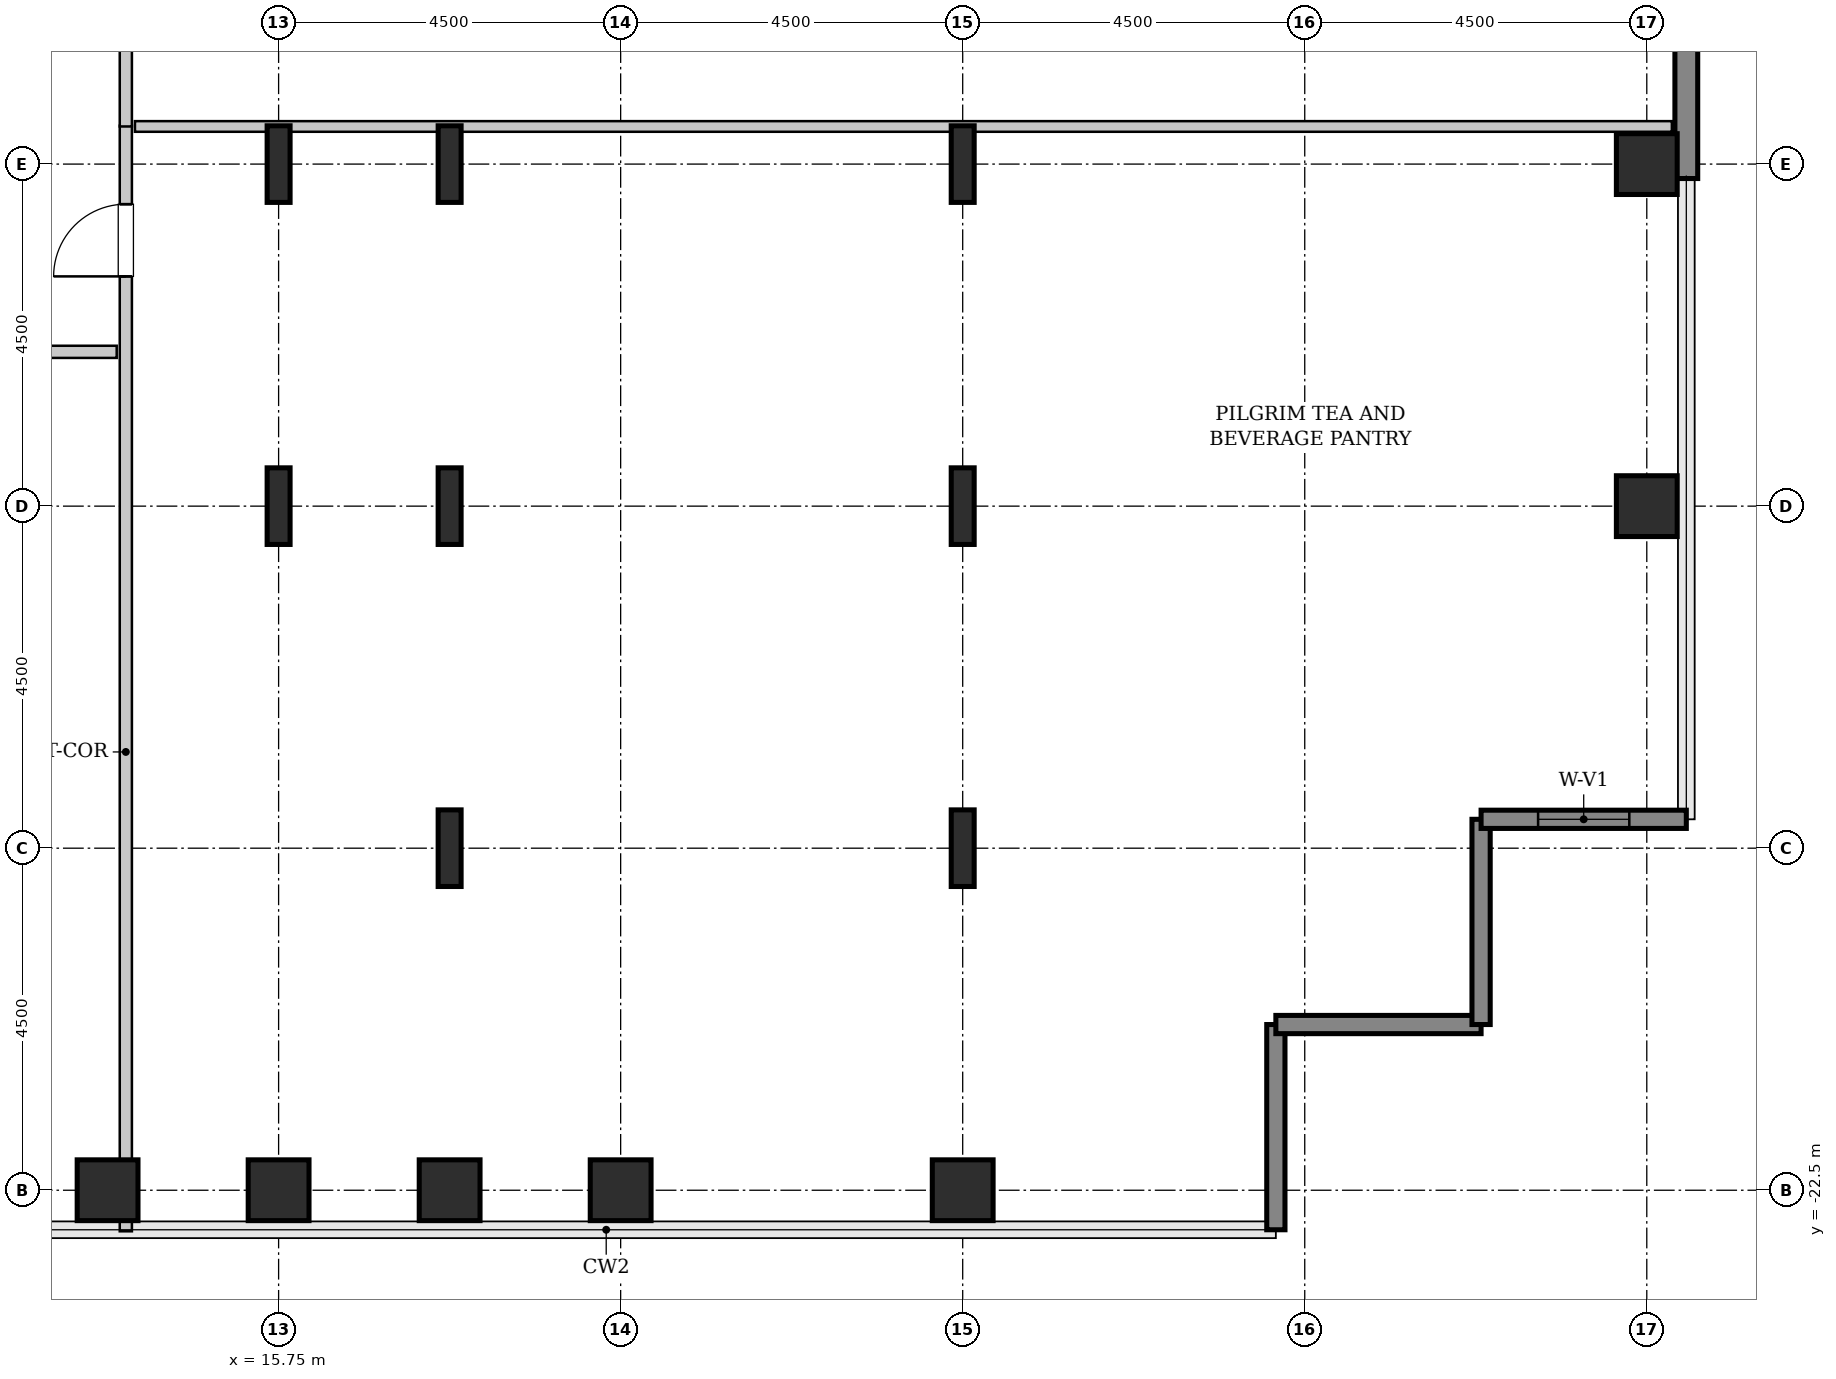
"""IFC4 building model, lengths in metres.
Left out: names, types, materials, properties, quantities, classifications, styles, units other than length and angle.
Written with IfcOpenShell. Run it as: python <this file> out.ifc"""

import sys

from ifc_helpers import new_model, si_unit, direction, frame, frame_2d, origin, origin_2d, place, context, subcontext, project, spatial, rectangle, hollow_rectangle, i_section, extrude, source, transform, mapped, element, fill, save


model = new_model("IFC4")
c1 = context("Model", 3, precision=1e-05, world=origin(), true_north=direction((0.0, 1.0)))
c2 = subcontext(c1, "Body", "Model", "MODEL_VIEW")
j1 = project(units=[si_unit("LENGTHUNIT", "METRE"), si_unit("PLANEANGLEUNIT", "RADIAN")], contexts=[c1])
p1 = place(None, origin())
s1 = spatial("IfcSite", under=j1, at=p1, CompositionType="ELEMENT")
p2 = place(p1, origin())
s2 = spatial("IfcBuilding", under=s1, at=p2, CompositionType="ELEMENT")
p3 = place(p2, frame((0.0, 0.0, 136.4)))
s3 = spatial("IfcBuildingStorey", under=s2, at=p3, CompositionType="ELEMENT", Elevation=136.4)
m1 = source(origin(), c2, "Body", "SweptSolid", [
    extrude(hollow_rectangle(XDim=0.8, YDim=0.8, WallThickness=0.04, InnerFilletRadius=0.04, OuterFilletRadius=0.08, at=origin_2d()), origin(), (0.0, 0.0, 1.0), 3.8),
])
for number, where, z_axis, x_axis in (
    (1, (13.5, -22.5, 0.0), (0.0, 0.0, 1.0), (1.0, 0.0, 0.0)),
    (2, (15.75, -22.5, 0.0), (0.0, 0.0, 1.0), (1.0, 0.0, 0.0)),
):
    element("IfcColumn", number, at=place(p3, frame(where, z_axis=z_axis, x_axis=x_axis)), inside=s3, PredefinedType="COLUMN", context=c2, shape_type="MappedRepresentation", body=[
        mapped(m1, transform((0.0, 0.0, 0.0), x_axis=(1.0, 0.0, 0.0), y_axis=(0.0, 1.0, 0.0), z_axis=(0.0, 0.0, 1.0), scale=1.0)),
    ])
m2 = source(origin(), c2, "Body", "SweptSolid", [
    extrude(i_section(OverallWidth=0.302, OverallDepth=1.008, WebThickness=0.021, FlangeThickness=0.04, FilletRadius=0.03, at=origin_2d()), origin(), (0.0, 0.0, 1.0), 3.8),
])
for number, where, z_axis, x_axis in (
    (3, (15.75, -13.5, 0.0), (0.0, 0.0, 1.0), (1.0, 0.0, 0.0)),
    (4, (15.75, -9.0, 0.0), (0.0, 0.0, 1.0), (1.0, 0.0, 0.0)),
):
    element("IfcColumn", number, at=place(p3, frame(where, z_axis=z_axis, x_axis=x_axis)), inside=s3, PredefinedType="COLUMN", context=c2, shape_type="MappedRepresentation", body=[
        mapped(m2, transform((0.0, 0.0, 0.0), x_axis=(1.0, 0.0, 0.0), y_axis=(0.0, 1.0, 0.0), z_axis=(0.0, 0.0, 1.0), scale=1.0)),
    ])
p4 = place(p3, frame((18.0, -22.5, 0.0), z_axis=(0.0, 0.0, 1.0), x_axis=(1.0, 0.0, 0.0)))
e5 = element("IfcColumn", 5, at=p4, inside=s3, PredefinedType="COLUMN", context=c2, shape_type="MappedRepresentation", body=[
    mapped(m1, transform((0.0, 0.0, 0.0), x_axis=(1.0, 0.0, 0.0), y_axis=(0.0, 1.0, 0.0), z_axis=(0.0, 0.0, 1.0), scale=1.0)),
])
for number, where, z_axis, x_axis in (
    (6, (18.0, -18.0, 0.0), (0.0, 0.0, 1.0), (1.0, 0.0, 0.0)),
    (7, (18.0, -13.5, 0.0), (0.0, 0.0, 1.0), (1.0, 0.0, 0.0)),
    (8, (18.0, -9.0, 0.0), (0.0, 0.0, 1.0), (1.0, 0.0, 0.0)),
):
    element("IfcColumn", number, at=place(p3, frame(where, z_axis=z_axis, x_axis=x_axis)), inside=s3, PredefinedType="COLUMN", context=c2, shape_type="MappedRepresentation", body=[
        mapped(m2, transform((0.0, 0.0, 0.0), x_axis=(1.0, 0.0, 0.0), y_axis=(0.0, 1.0, 0.0), z_axis=(0.0, 0.0, 1.0), scale=1.0)),
    ])
for number, where, z_axis, x_axis in (
    (9, (20.25, -22.5, 0.0), (0.0, 0.0, 1.0), (1.0, 0.0, 0.0)),
    (10, (24.75, -22.5, 0.0), (0.0, 0.0, 1.0), (1.0, 0.0, 0.0)),
):
    element("IfcColumn", number, at=place(p3, frame(where, z_axis=z_axis, x_axis=x_axis)), inside=s3, PredefinedType="COLUMN", context=c2, shape_type="MappedRepresentation", body=[
        mapped(m1, transform((0.0, 0.0, 0.0), x_axis=(1.0, 0.0, 0.0), y_axis=(0.0, 1.0, 0.0), z_axis=(0.0, 0.0, 1.0), scale=1.0)),
    ])
for number, where, z_axis, x_axis in (
    (11, (24.75, -18.0, 0.0), (0.0, 0.0, 1.0), (1.0, 0.0, 0.0)),
    (12, (24.75, -13.5, 0.0), (0.0, 0.0, 1.0), (1.0, 0.0, 0.0)),
    (13, (24.75, -9.0, 0.0), (0.0, 0.0, 1.0), (1.0, 0.0, 0.0)),
):
    element("IfcColumn", number, at=place(p3, frame(where, z_axis=z_axis, x_axis=x_axis)), inside=s3, PredefinedType="COLUMN", context=c2, shape_type="MappedRepresentation", body=[
        mapped(m2, transform((0.0, 0.0, 0.0), x_axis=(1.0, 0.0, 0.0), y_axis=(0.0, 1.0, 0.0), z_axis=(0.0, 0.0, 1.0), scale=1.0)),
    ])
for number, where, z_axis, x_axis in (
    (14, (33.75, -13.5, 0.0), (0.0, 0.0, 1.0), (1.0, 0.0, 0.0)),
    (15, (33.75, -9.0, 0.0), (0.0, 0.0, 1.0), (1.0, 0.0, 0.0)),
):
    element("IfcColumn", number, at=place(p3, frame(where, z_axis=z_axis, x_axis=x_axis)), inside=s3, PredefinedType="COLUMN", context=c2, shape_type="MappedRepresentation", body=[
        mapped(m1, transform((0.0, 0.0, 0.0), x_axis=(1.0, 0.0, 0.0), y_axis=(0.0, 1.0, 0.0), z_axis=(0.0, 0.0, 1.0), scale=1.0)),
    ])
m3 = source(origin(), c2, "Body", "SweptSolid", [
    extrude(rectangle(XDim=4.88, YDim=0.3, at=frame_2d((2.44, 0.0))), origin(), (0.0, 0.0, 1.0), 3.55),
])
p5 = place(p3, frame((34.27, -9.19, 0.0), z_axis=(0.0, 0.0, 1.0), x_axis=(0.0, 1.0, 0.0)))
e16 = element("IfcWall", 16, at=p5, inside=s3, PredefinedType="SHEAR", context=c2, shape_type="MappedRepresentation", body=[
    mapped(m3, transform((0.0, 0.0, 0.0), x_axis=(1.0, 0.0, 0.0), y_axis=(0.0, 1.0, 0.0), z_axis=(0.0, 0.0, 1.0), scale=1.0)),
])
m4 = source(origin(), c2, "Body", "SweptSolid", [
    extrude(rectangle(XDim=2.7, YDim=0.24, at=frame_2d((1.35, 0.0))), origin(), (0.0, 0.0, 1.0), 3.55),
])
for number, where, z_axis, x_axis in (
    (17, (28.87, -23.02, 0.0), (0.0, 0.0, 1.0), (0.0, 1.0, 0.0)),
    (18, (28.87, -20.32, 0.0), (0.0, 0.0, 1.0), (1.0, 0.0, 0.0)),
    (19, (31.57, -20.32, 0.0), (0.0, 0.0, 1.0), (0.0, 1.0, 0.0)),
):
    element("IfcWall", number, at=place(p3, frame(where, z_axis=z_axis, x_axis=x_axis)), inside=s3, PredefinedType="SHEAR", context=c2, shape_type="MappedRepresentation", body=[
        mapped(m4, transform((0.0, 0.0, 0.0), x_axis=(1.0, 0.0, 0.0), y_axis=(0.0, 1.0, 0.0), z_axis=(0.0, 0.0, 1.0), scale=1.0)),
    ])
p6 = place(p3, frame((31.57, -17.62, 0.0), z_axis=(0.0, 0.0, 1.0), x_axis=(1.0, 0.0, 0.0)))
e20 = element("IfcWall", 20, at=p6, inside=s3, PredefinedType="SHEAR", context=c2, shape_type="MappedRepresentation", body=[
    mapped(m4, transform((0.0, 0.0, 0.0), x_axis=(1.0, 0.0, 0.0), y_axis=(0.0, 1.0, 0.0), z_axis=(0.0, 0.0, 1.0), scale=1.0)),
])
p7 = place(p6, frame((0.75, 0.0, 0.85)))
e21 = element("IfcOpeningElement", 21, at=p7, cuts=e20, PredefinedType="OPENING", context=c2, shape_type="SweptSolid", body=[
    extrude(rectangle(XDim=1.2, YDim=1.8, at=frame_2d((0.6, 0.9))), frame((0.0, 0.13, 0.0), z_axis=(0.0, -1.0, 0.0), x_axis=(1.0, 0.0, 0.0)), (0.0, 0.0, 1.0), 0.26),
])
m5 = source(origin(), c2, "Body", "SweptSolid", [
    extrude(rectangle(XDim=14.545, YDim=0.16, at=frame_2d((7.272, 0.0))), origin(), (0.0, 0.0, 1.0), 3.535),
])
p8 = place(p3, frame((13.74, -23.04, 0.0), z_axis=(0.0, 0.0, 1.0), x_axis=(0.0, 1.0, 0.0)))
e22 = element("IfcWall", 22, at=p8, inside=s3, PredefinedType="PARTITIONING", context=c2, shape_type="MappedRepresentation", body=[
    mapped(m5, transform((0.0, 0.0, 0.0), x_axis=(1.0, 0.0, 0.0), y_axis=(0.0, 1.0, 0.0), z_axis=(0.0, 0.0, 1.0), scale=1.0)),
])
p9 = place(p8, frame((12.562, 0.0, 0.0)))
e23 = element("IfcOpeningElement", 23, at=p9, cuts=e22, PredefinedType="OPENING", context=c2, shape_type="SweptSolid", body=[
    extrude(rectangle(XDim=0.95, YDim=2.1, at=frame_2d((0.475, 1.05))), frame((0.0, 0.09, 0.0), z_axis=(0.0, -1.0, 0.0), x_axis=(1.0, 0.0, 0.0)), (0.0, 0.0, 1.0), 0.18),
])
m6 = source(origin(), c2, "Body", "SweptSolid", [
    extrude(rectangle(XDim=20.22, YDim=0.14, at=frame_2d((10.11, 0.0))), origin(), (0.0, 0.0, 1.0), 2.875),
])
p10 = place(p3, frame((13.86, -8.505, 0.0), z_axis=(0.0, 0.0, 1.0), x_axis=(1.0, 0.0, 0.0)))
e24 = element("IfcWall", 24, at=p10, inside=s3, PredefinedType="PARTITIONING", context=c2, shape_type="MappedRepresentation", body=[
    mapped(m6, transform((0.0, 0.0, 0.0), x_axis=(1.0, 0.0, 0.0), y_axis=(0.0, 1.0, 0.0), z_axis=(0.0, 0.0, 1.0), scale=1.0)),
])
m7 = source(origin(), c2, "Body", "SweptSolid", [
    extrude(rectangle(XDim=3.31, YDim=0.16, at=frame_2d((1.655, 0.0))), origin(), (0.0, 0.0, 1.0), 3.535),
])
p11 = place(p3, frame((13.74, -8.505, 0.0), z_axis=(0.0, 0.0, 1.0), x_axis=(0.0, 1.0, 0.0)))
e25 = element("IfcWall", 25, at=p11, inside=s3, PredefinedType="PARTITIONING", context=c2, shape_type="MappedRepresentation", body=[
    mapped(m7, transform((0.0, 0.0, 0.0), x_axis=(1.0, 0.0, 0.0), y_axis=(0.0, 1.0, 0.0), z_axis=(0.0, 0.0, 1.0), scale=1.0)),
])
p12 = place(p11, frame((1.18, 0.0, 0.0)))
e26 = element("IfcOpeningElement", 26, at=p12, cuts=e25, PredefinedType="OPENING", context=c2, shape_type="SweptSolid", body=[
    extrude(rectangle(XDim=0.95, YDim=2.1, at=frame_2d((0.475, 1.05))), frame((0.0, 0.09, 0.0), z_axis=(0.0, -1.0, 0.0), x_axis=(1.0, 0.0, 0.0)), (0.0, 0.0, 1.0), 0.18),
])
m8 = source(origin(), c2, "Body", "SweptSolid", [
    extrude(rectangle(XDim=6.825, YDim=0.16, at=frame_2d((3.413, 0.0))), origin(), (0.0, 0.0, 1.0), 3.535),
])
p13 = place(p3, frame((6.795, -11.47, 0.0), z_axis=(0.0, 0.0, 1.0), x_axis=(1.0, 0.0, 0.0)))
e27 = element("IfcWall", 27, at=p13, inside=s3, PredefinedType="PARTITIONING", context=c2, shape_type="MappedRepresentation", body=[
    mapped(m8, transform((0.0, 0.0, 0.0), x_axis=(1.0, 0.0, 0.0), y_axis=(0.0, 1.0, 0.0), z_axis=(0.0, 0.0, 1.0), scale=1.0)),
])
p14 = place(p13, frame((2.938, 0.0, 0.0)))
e28 = element("IfcOpeningElement", 28, at=p14, cuts=e27, PredefinedType="OPENING", context=c2, shape_type="SweptSolid", body=[
    extrude(rectangle(XDim=0.95, YDim=2.1, at=frame_2d((0.475, 1.05))), frame((0.0, 0.09, 0.0), z_axis=(0.0, -1.0, 0.0), x_axis=(1.0, 0.0, 0.0)), (0.0, 0.0, 1.0), 0.18),
])
m9 = source(origin(), c2, "Body", "SweptSolid", [
    extrude(rectangle(XDim=1.2, YDim=1.8, at=frame_2d((0.6, 0.9))), frame((0.0, 0.03, 0.0), z_axis=(0.0, -1.0, 0.0), x_axis=(1.0, 0.0, 0.0)), (0.0, 0.0, 1.0), 0.06),
])
p15 = place(p7, origin())
e29 = element("IfcWindow", 29, at=p15, inside=s3, PartitioningType="SINGLE_PANEL", PredefinedType="WINDOW", context=c2, shape_type="MappedRepresentation", body=[
    mapped(m9, transform((0.0, 0.0, 0.0), x_axis=(1.0, 0.0, 0.0), y_axis=(0.0, 1.0, 0.0), z_axis=(0.0, 0.0, 1.0), scale=1.0)),
])
fill(e21, e29)
m10 = source(origin(), c2, "Body", "SweptSolid", [
    extrude(rectangle(XDim=0.95, YDim=2.1, at=frame_2d((0.475, 1.05))), frame((0.0, 0.025, 0.0), z_axis=(0.0, -1.0, 0.0), x_axis=(1.0, 0.0, 0.0)), (0.0, 0.0, 1.0), 0.05),
])
p16 = place(p9, origin())
e30 = element("IfcDoor", 30, at=p16, inside=s3, OperationType="SINGLE_SWING_LEFT", PredefinedType="DOOR", context=c2, shape_type="MappedRepresentation", body=[
    mapped(m10, transform((0.0, 0.0, 0.0), x_axis=(1.0, 0.0, 0.0), y_axis=(0.0, 1.0, 0.0), z_axis=(0.0, 0.0, 1.0), scale=1.0)),
])
fill(e23, e30)
save(model, sys.argv[1])
